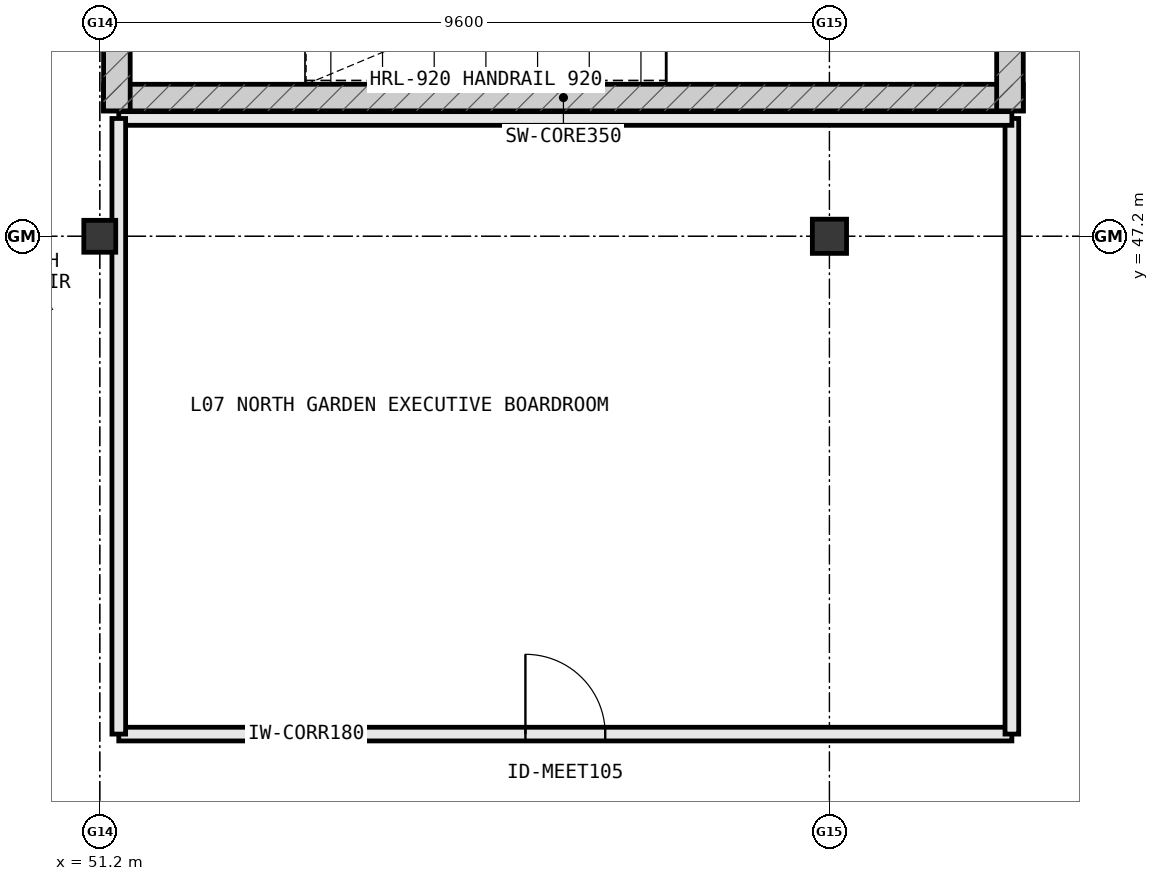
"""IFC4 building model, lengths in metres.
Left out: names, types, materials, properties, quantities, classifications, styles, units other than length and angle.
Written with IfcOpenShell. Run it as: python <this file> out.ifc"""

import sys

from ifc_helpers import new_model, si_unit, direction, frame, frame_2d, origin, origin_2d, place, context, subcontext, project, spatial, rectangle, extrude, element, fill, save


model = new_model("IFC4")
c1 = context("Model", 3, precision=1e-05, world=origin(), true_north=direction((0.0, 1.0)))
c2 = subcontext(c1, "Body", "Model", "MODEL_VIEW")
j1 = project(units=[si_unit("LENGTHUNIT", "METRE"), si_unit("PLANEANGLEUNIT", "RADIAN")], contexts=[c1])
p1 = place(None, origin())
s1 = spatial("IfcSite", under=j1, at=p1, CompositionType="ELEMENT")
p2 = place(p1, origin())
s2 = spatial("IfcBuilding", under=s1, at=p2, CompositionType="ELEMENT")
p3 = place(p2, frame((0.0, 0.0, 31.4)))
s3 = spatial("IfcBuildingStorey", under=s2, at=p3, CompositionType="ELEMENT", Elevation=31.4)
p4 = place(p3, frame((60.8, 47.2, 0.0), z_axis=(0.0, 0.0, 1.0), x_axis=(1.0, 0.0, 0.0)))
e1 = element("IfcColumn", 1, at=p4, inside=s3, PredefinedType="COLUMN", context=c2, shape_type="SweptSolid", body=[
    extrude(rectangle(XDim=0.45, YDim=0.45, at=origin_2d()), origin(), (0.0, 0.0, 1.0), 3.8),
])
p5 = place(p3, frame((51.2, 47.2, 0.0), z_axis=(0.0, 0.0, 1.0), x_axis=(1.0, 0.0, 0.0)))
e2 = element("IfcColumn", 2, at=p5, inside=s3, PredefinedType="COLUMN", context=c2, shape_type="SweptSolid", body=[
    extrude(rectangle(XDim=0.42, YDim=0.42, at=origin_2d()), origin(), (0.0, 0.0, 1.0), 3.8),
])
p6 = place(p3, frame((51.25, 49.025, 0.0), z_axis=(0.0, 0.0, 1.0), x_axis=(1.0, 0.0, 0.0)))
e3 = element("IfcWall", 3, at=p6, inside=s3, PredefinedType="SHEAR", context=c2, shape_type="SweptSolid", body=[
    extrude(rectangle(XDim=12.1, YDim=0.35, at=frame_2d((6.05, 0.0))), origin(), (0.0, 0.0, 1.0), 3.8),
])
p7 = place(p3, frame((63.175, 48.85, 0.0), z_axis=(0.0, 0.0, 1.0), x_axis=(0.0, 1.0, 0.0)))
e4 = element("IfcWall", 4, at=p7, inside=s3, PredefinedType="SHEAR", context=c2, shape_type="SweptSolid", body=[
    extrude(rectangle(XDim=4.5, YDim=0.35, at=frame_2d((2.25, 0.0))), origin(), (0.0, 0.0, 1.0), 3.8),
])
p8 = place(p3, frame((51.425, 53.35, 0.0), z_axis=(0.0, 0.0, 1.0), x_axis=(0.0, -1.0, 0.0)))
e5 = element("IfcWall", 5, at=p8, inside=s3, PredefinedType="SHEAR", context=c2, shape_type="SweptSolid", body=[
    extrude(rectangle(XDim=4.5, YDim=0.35, at=frame_2d((2.25, 0.0))), origin(), (0.0, 0.0, 1.0), 3.8),
])
p9 = place(p8, frame((1.7, 0.0, 0.0)))
e6 = element("IfcOpeningElement", 6, at=p9, cuts=e5, PredefinedType="OPENING", context=c2, shape_type="SweptSolid", body=[
    extrude(rectangle(XDim=1.1, YDim=2.2, at=frame_2d((0.55, 1.1))), frame((0.0, 0.187, 0.0), z_axis=(0.0, -1.0, 0.0), x_axis=(1.0, 0.0, 0.0)), (0.0, 0.0, 1.0), 0.374),
])
p10 = place(p3, frame((51.45, 40.65, 0.0), z_axis=(0.0, 0.0, 1.0), x_axis=(1.0, 0.0, 0.0)))
e7 = element("IfcWall", 7, at=p10, inside=s3, PredefinedType="PARTITIONING", context=c2, shape_type="SweptSolid", body=[
    extrude(rectangle(XDim=11.75, YDim=0.18, at=frame_2d((5.875, 0.0))), origin(), (0.0, 0.0, 1.0), 3.555),
])
p11 = place(p10, frame((5.35, 0.0, 0.0)))
e8 = element("IfcOpeningElement", 8, at=p11, cuts=e7, PredefinedType="OPENING", context=c2, shape_type="SweptSolid", body=[
    extrude(rectangle(XDim=1.05, YDim=2.2, at=frame_2d((0.525, 1.1))), frame((0.0, 0.102, 0.0), z_axis=(0.0, -1.0, 0.0), x_axis=(1.0, 0.0, 0.0)), (0.0, 0.0, 1.0), 0.204),
])
p12 = place(p3, frame((63.2, 40.65, 0.0), z_axis=(0.0, 0.0, 1.0), x_axis=(0.0, 1.0, 0.0)))
e9 = element("IfcWall", 9, at=p12, inside=s3, PredefinedType="PARTITIONING", context=c2, shape_type="SweptSolid", body=[
    extrude(rectangle(XDim=8.1, YDim=0.18, at=frame_2d((4.05, 0.0))), origin(), (0.0, 0.0, 1.0), 3.555),
])
p13 = place(p3, frame((63.2, 48.75, 0.0), z_axis=(0.0, 0.0, 1.0), x_axis=(-1.0, 0.0, 0.0)))
e10 = element("IfcWall", 10, at=p13, inside=s3, PredefinedType="PARTITIONING", context=c2, shape_type="SweptSolid", body=[
    extrude(rectangle(XDim=11.75, YDim=0.18, at=frame_2d((5.875, 0.0))), origin(), (0.0, 0.0, 1.0), 3.555),
])
p14 = place(p3, frame((51.45, 48.75, 0.0), z_axis=(0.0, 0.0, 1.0), x_axis=(0.0, -1.0, 0.0)))
e11 = element("IfcWall", 11, at=p14, inside=s3, PredefinedType="PARTITIONING", context=c2, shape_type="SweptSolid", body=[
    extrude(rectangle(XDim=8.1, YDim=0.18, at=frame_2d((4.05, 0.0))), origin(), (0.0, 0.0, 1.0), 2.91),
])
p15 = place(p11, origin())
e12 = element("IfcDoor", 12, at=p15, inside=s3, OperationType="SINGLE_SWING_LEFT", PredefinedType="DOOR", context=c2, shape_type="SweptSolid", body=[
    extrude(rectangle(XDim=1.05, YDim=2.2, at=frame_2d((0.525, 1.1))), frame((0.0, 0.025, 0.0), z_axis=(0.0, -1.0, 0.0), x_axis=(1.0, 0.0, 0.0)), (0.0, 0.0, 1.0), 0.05),
])
fill(e8, e12)
save(model, sys.argv[1])
